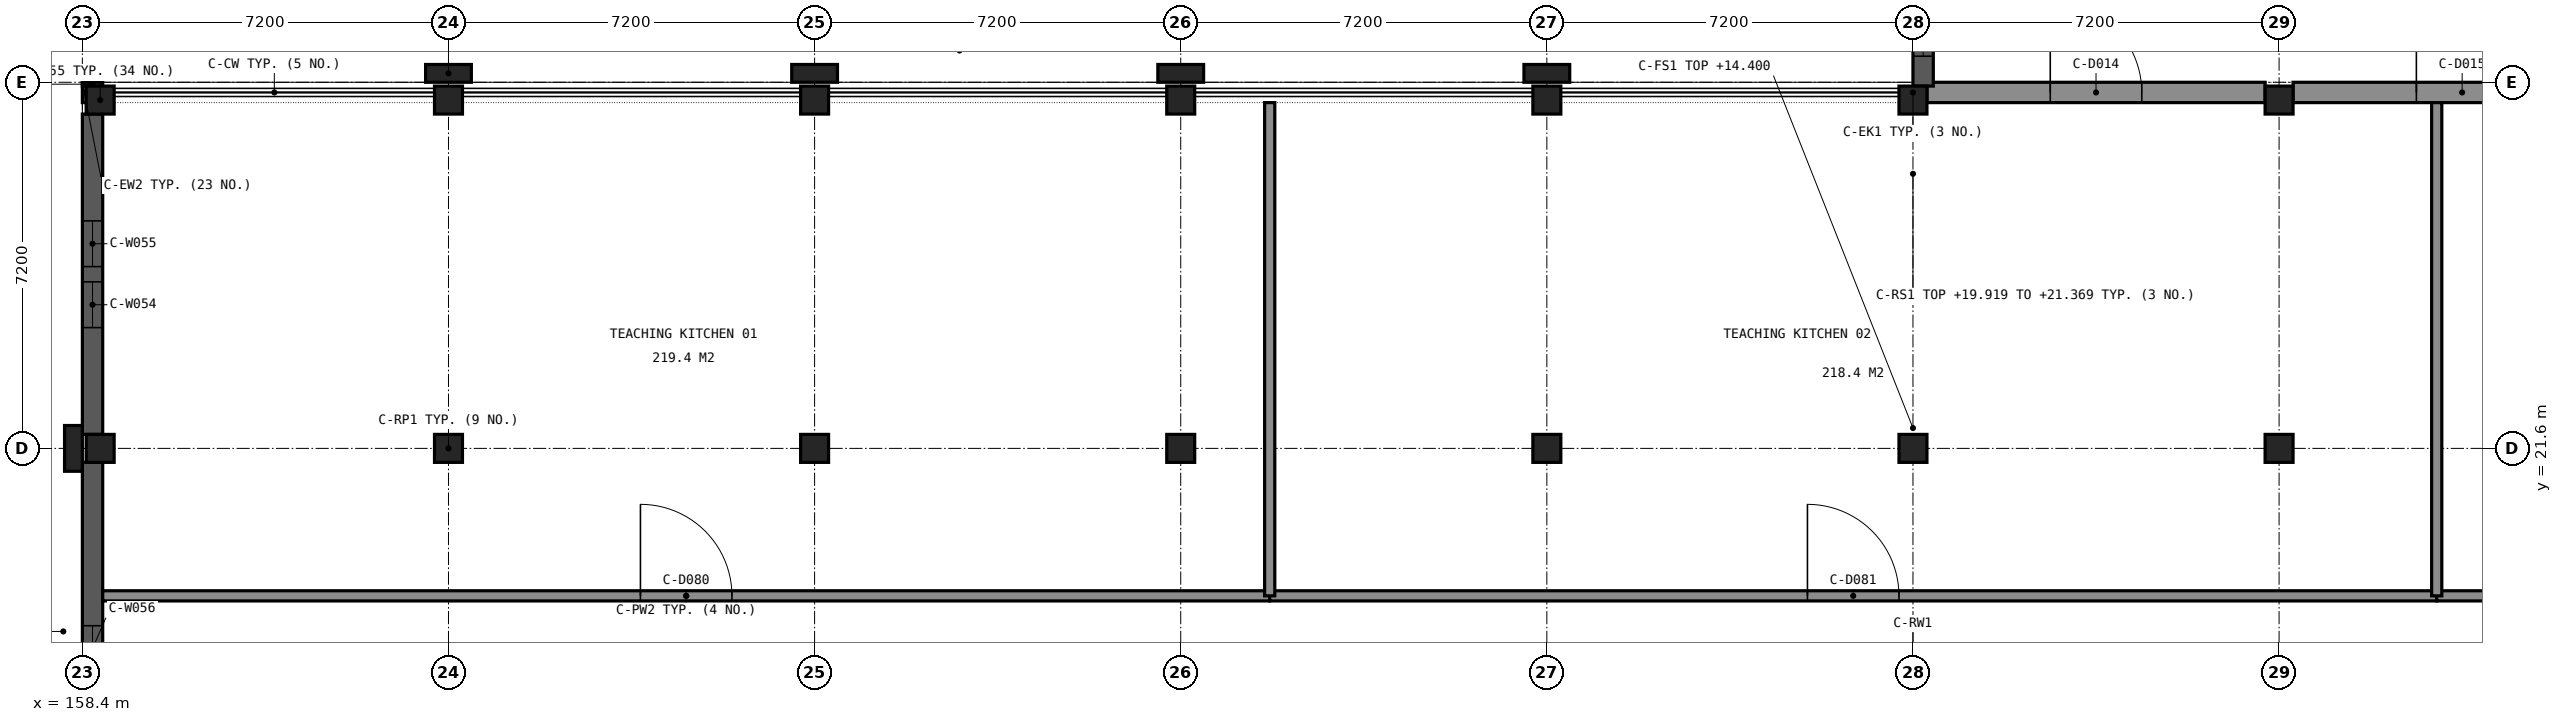
"""IFC4 building model, lengths in metres.
Left out: names, types, materials, properties, quantities, classifications, styles, units other than length and angle.
Written with IfcOpenShell. Run it as: python <this file> out.ifc"""

import sys

from ifc_helpers import new_model, si_unit, direction, frame, frame_2d, origin, origin_2d, place, context, subcontext, project, spatial, rectangle, extrude, element, fill, save


model = new_model("IFC4")
c1 = context("Model", 3, precision=1e-05, world=origin(), true_north=direction((0.0, 1.0)))
c2 = subcontext(c1, "Body", "Model", "MODEL_VIEW")
j1 = project(units=[si_unit("LENGTHUNIT", "METRE"), si_unit("PLANEANGLEUNIT", "RADIAN")], contexts=[c1])
p1 = place(None, origin())
s1 = spatial("IfcSite", under=j1, at=p1, CompositionType="ELEMENT")
p2 = place(p1, origin())
s2 = spatial("IfcBuilding", under=s1, at=p2, CompositionType="ELEMENT")
p3 = place(p2, frame((0.0, 0.0, 14.4)))
s3 = spatial("IfcBuildingStorey", under=s2, at=p3, CompositionType="ELEMENT", Elevation=14.4)
for number, where, z_axis, x_axis in (
    (1, (158.75, 28.45, 0.0), (0.0, 0.0, 1.0), (1.0, 0.0, 0.0)),
    (2, (165.6, 28.45, 0.0), (0.0, 0.0, 1.0), (1.0, 0.0, 0.0)),
    (3, (172.8, 28.45, 0.0), (0.0, 0.0, 1.0), (1.0, 0.0, 0.0)),
    (4, (180.0, 28.45, 0.0), (0.0, 0.0, 1.0), (1.0, 0.0, 0.0)),
    (5, (187.2, 28.45, 0.0), (0.0, 0.0, 1.0), (1.0, 0.0, 0.0)),
    (6, (194.4, 28.45, 0.0), (0.0, 0.0, 1.0), (1.0, 0.0, 0.0)),
    (7, (201.6, 28.45, 0.0), (0.0, 0.0, 1.0), (1.0, 0.0, 0.0)),
    (8, (158.75, 21.6, 0.0), (0.0, 0.0, 1.0), (1.0, 0.0, 0.0)),
    (9, (165.6, 21.6, 0.0), (0.0, 0.0, 1.0), (1.0, 0.0, 0.0)),
    (10, (172.8, 21.6, 0.0), (0.0, 0.0, 1.0), (1.0, 0.0, 0.0)),
    (11, (180.0, 21.6, 0.0), (0.0, 0.0, 1.0), (1.0, 0.0, 0.0)),
    (12, (187.2, 21.6, 0.0), (0.0, 0.0, 1.0), (1.0, 0.0, 0.0)),
    (13, (194.4, 21.6, 0.0), (0.0, 0.0, 1.0), (1.0, 0.0, 0.0)),
    (14, (201.6, 21.6, 0.0), (0.0, 0.0, 1.0), (1.0, 0.0, 0.0)),
):
    element("IfcColumn", number, at=place(p3, frame(where, z_axis=z_axis, x_axis=x_axis)), inside=s3, PredefinedType="COLUMN", context=c2, shape_type="SweptSolid", body=[
        extrude(rectangle(XDim=0.55, YDim=0.55, at=origin_2d()), origin(), (0.0, 0.0, 1.0), 4.8),
    ])
p4 = place(p3, frame((158.4, 28.6, 0.0), z_axis=(0.0, 0.0, 1.0), x_axis=(1.0, 0.0, 0.0)))
e15 = element("IfcWall", 15, at=p4, inside=s3, PredefinedType="SOLIDWALL", context=c2, shape_type="SweptSolid", body=[
    extrude(rectangle(XDim=0.075, YDim=0.4, at=frame_2d((0.038, 0.0))), origin(), (0.0, 0.0, 1.0), 3.7),
])
p5 = place(p3, frame((194.675, 28.6, 0.0), z_axis=(0.0, 0.0, 1.0), x_axis=(1.0, 0.0, 0.0)))
e16 = element("IfcWall", 16, at=p5, inside=s3, PredefinedType="SOLIDWALL", context=c2, shape_type="SweptSolid", body=[
    extrude(rectangle(XDim=6.65, YDim=0.4, at=frame_2d((3.325, 0.0))), origin(), (0.0, 0.0, 1.0), 3.7),
])
p6 = place(p5, frame((2.425, 0.0, 0.0)))
e17 = element("IfcOpeningElement", 17, at=p6, cuts=e16, PredefinedType="OPENING", context=c2, shape_type="SweptSolid", body=[
    extrude(rectangle(XDim=1.8, YDim=2.1, at=frame_2d((0.9, 1.05))), frame((0.0, 0.21, 0.0), z_axis=(0.0, -1.0, 0.0), x_axis=(1.0, 0.0, 0.0)), (0.0, 0.0, 1.0), 0.42),
])
p7 = place(p3, frame((201.875, 28.6, 0.0), z_axis=(0.0, 0.0, 1.0), x_axis=(1.0, 0.0, 0.0)))
e18 = element("IfcWall", 18, at=p7, inside=s3, PredefinedType="SOLIDWALL", context=c2, shape_type="SweptSolid", body=[
    extrude(rectangle(XDim=6.65, YDim=0.4, at=frame_2d((3.325, 0.0))), origin(), (0.0, 0.0, 1.0), 3.7),
])
p8 = place(p7, frame((2.425, 0.0, 0.0)))
e19 = element("IfcOpeningElement", 19, at=p8, cuts=e18, PredefinedType="OPENING", context=c2, shape_type="SweptSolid", body=[
    extrude(rectangle(XDim=1.8, YDim=2.1, at=frame_2d((0.9, 1.05))), frame((0.0, 0.21, 0.0), z_axis=(0.0, -1.0, 0.0), x_axis=(1.0, 0.0, 0.0)), (0.0, 0.0, 1.0), 0.42),
])
p9 = place(p3, frame((158.6, 28.725, 0.0), z_axis=(0.0, 0.0, 1.0), x_axis=(0.0, 1.0, 0.0)))
e20 = element("IfcWall", 20, at=p9, inside=s3, PredefinedType="SHEAR", context=c2, shape_type="SweptSolid", body=[
    extrude(rectangle(XDim=0.075, YDim=0.4, at=frame_2d((0.038, 0.0))), origin(), (0.0, 0.0, 1.0), 3.7),
])
p10 = place(p3, frame((158.6, 21.875, 0.0), z_axis=(0.0, 0.0, 1.0), x_axis=(0.0, 1.0, 0.0)))
e21 = element("IfcWall", 21, at=p10, inside=s3, PredefinedType="SHEAR", context=c2, shape_type="SweptSolid", body=[
    extrude(rectangle(XDim=6.3, YDim=0.4, at=frame_2d((3.15, 0.0))), origin(), (0.0, 0.0, 1.0), 3.7),
])
p11 = place(p10, frame((2.1, 0.0, 1.8)))
e22 = element("IfcOpeningElement", 22, at=p11, cuts=e21, PredefinedType="OPENING", context=c2, shape_type="SweptSolid", body=[
    extrude(rectangle(XDim=0.9, YDim=1.2, at=frame_2d((0.45, 0.6))), frame((0.0, 0.21, 0.0), z_axis=(0.0, -1.0, 0.0), x_axis=(1.0, 0.0, 0.0)), (0.0, 0.0, 1.0), 0.42),
])
p12 = place(p10, frame((3.3, 0.0, 1.8)))
e23 = element("IfcOpeningElement", 23, at=p12, cuts=e21, PredefinedType="OPENING", context=c2, shape_type="SweptSolid", body=[
    extrude(rectangle(XDim=0.9, YDim=1.2, at=frame_2d((0.45, 0.6))), frame((0.0, 0.21, 0.0), z_axis=(0.0, -1.0, 0.0), x_axis=(1.0, 0.0, 0.0)), (0.0, 0.0, 1.0), 0.42),
])
p13 = place(p3, frame((158.6, 15.2, 0.0), z_axis=(0.0, 0.0, 1.0), x_axis=(0.0, 1.0, 0.0)))
e24 = element("IfcWall", 24, at=p13, inside=s3, PredefinedType="SHEAR", context=c2, shape_type="SweptSolid", body=[
    extrude(rectangle(XDim=6.125, YDim=0.4, at=frame_2d((3.062, 0.0))), origin(), (0.0, 0.0, 1.0), 3.7),
])
p14 = place(p13, frame((2.012, 0.0, 1.8)))
e25 = element("IfcOpeningElement", 25, at=p14, cuts=e24, PredefinedType="OPENING", context=c2, shape_type="SweptSolid", body=[
    extrude(rectangle(XDim=0.9, YDim=1.2, at=frame_2d((0.45, 0.6))), frame((0.0, 0.21, 0.0), z_axis=(0.0, -1.0, 0.0), x_axis=(1.0, 0.0, 0.0)), (0.0, 0.0, 1.0), 0.42),
])
p15 = place(p3, frame((158.4, 28.6, 4.8), z_axis=(0.0, 0.0, 1.0), x_axis=(1.0, 0.0, 0.0)))
e26 = element("IfcWall", 26, at=p15, inside=s3, PredefinedType="SOLIDWALL", context=c2, shape_type="SweptSolid", body=[
    extrude(rectangle(XDim=72.0, YDim=0.4, at=frame_2d((36.0, 0.0))), origin(), (0.0, 0.0, 1.0), 0.45),
])
p16 = place(p3, frame((158.6, 17.8, 4.8), z_axis=(0.0, 0.0, 1.0), x_axis=(0.0, 1.0, 0.0)))
e27 = element("IfcWall", 27, at=p16, inside=s3, PredefinedType="SOLIDWALL", context=c2, shape_type="SweptSolid", body=[
    extrude(rectangle(XDim=10.6, YDim=0.4, at=frame_2d((5.3, 0.0))), origin(), (0.0, 0.0, 1.0), 0.45),
])
for number, where, z_axis, x_axis in (
    (28, (165.6, 21.6, 4.8), (0.0, 0.0, 1.0), (1.0, 0.0, 0.0)),
    (29, (172.8, 21.6, 4.8), (0.0, 0.0, 1.0), (1.0, 0.0, 0.0)),
    (30, (180.0, 21.6, 4.8), (0.0, 0.0, 1.0), (1.0, 0.0, 0.0)),
    (31, (187.2, 21.6, 4.8), (0.0, 0.0, 1.0), (1.0, 0.0, 0.0)),
    (32, (194.4, 21.6, 4.8), (0.0, 0.0, 1.0), (1.0, 0.0, 0.0)),
    (33, (201.6, 21.6, 4.8), (0.0, 0.0, 1.0), (1.0, 0.0, 0.0)),
):
    element("IfcColumn", number, at=place(p3, frame(where, z_axis=z_axis, x_axis=x_axis)), inside=s3, PredefinedType="COLUMN", context=c2, shape_type="SweptSolid", body=[
        extrude(rectangle(XDim=0.3, YDim=0.3, at=origin_2d()), origin(), (0.0, 0.0, 1.0), 1.4),
    ])
p17 = place(p3, frame((158.6, 15.6, 4.8), z_axis=(0.0, 0.0, 1.0), x_axis=(0.0, 1.0, 0.0)))
e34 = element("IfcWall", 34, at=p17, inside=s3, PredefinedType="PARAPET", context=c2, shape_type="SweptSolid", body=[
    extrude(rectangle(XDim=2.2, YDim=0.4, at=frame_2d((1.1, 0.0))), origin(), (0.0, 0.0, 1.0), 0.4),
])
for number, where, z_axis, x_axis in (
    (35, (165.6, 28.975, 0.0), (0.0, 0.0, 1.0), (1.0, 0.0, 0.0)),
    (36, (172.8, 28.975, 0.0), (0.0, 0.0, 1.0), (1.0, 0.0, 0.0)),
    (37, (180.0, 28.975, 0.0), (0.0, 0.0, 1.0), (1.0, 0.0, 0.0)),
    (38, (187.2, 28.975, 0.0), (0.0, 0.0, 1.0), (1.0, 0.0, 0.0)),
    (39, (158.225, 21.6, 0.0), (0.0, 0.0, 1.0), (0.0, 1.0, 0.0)),
):
    element("IfcColumn", number, at=place(p3, frame(where, z_axis=z_axis, x_axis=x_axis)), inside=s3, PredefinedType="PILASTER", context=c2, shape_type="SweptSolid", body=[
        extrude(rectangle(XDim=0.9, YDim=0.35, at=origin_2d()), origin(), (0.0, 0.0, 1.0), 3.9),
    ])
p18 = place(p3, frame((157.65, 29.425, 4.5), z_axis=(0.0, 0.0, 1.0), x_axis=(1.0, 0.0, 0.0)))
e40 = element("IfcWall", 40, at=p18, inside=s3, PredefinedType="SOLIDWALL", context=c2, shape_type="SweptSolid", body=[
    extrude(rectangle(XDim=36.0, YDim=0.25, at=frame_2d((18.0, 0.0))), origin(), (0.0, 0.0, 1.0), 0.65),
])
p19 = place(p3, frame((157.775, 7.2, 4.5), z_axis=(0.0, 0.0, 1.0), x_axis=(0.0, 1.0, 0.0)))
e41 = element("IfcWall", 41, at=p19, inside=s3, PredefinedType="SOLIDWALL", context=c2, shape_type="SweptSolid", body=[
    extrude(rectangle(XDim=21.6, YDim=0.25, at=frame_2d((10.8, 0.0))), origin(), (0.0, 0.0, 1.0), 0.65),
])
p20 = place(p3, frame((194.6, 28.725, 0.0), z_axis=(0.0, 0.0, 1.0), x_axis=(0.0, 1.0, 0.0)))
e42 = element("IfcWall", 42, at=p20, inside=s3, PredefinedType="SOLIDWALL", context=c2, shape_type="SweptSolid", body=[
    extrude(rectangle(XDim=2.075, YDim=0.4, at=frame_2d((1.038, 0.0))), origin(), (0.0, 0.0, 1.0), 4.893),
])
p21 = place(p20, frame((0.587, 0.0, 1.8)))
e43 = element("IfcOpeningElement", 43, at=p21, cuts=e42, PredefinedType="OPENING", context=c2, shape_type="SweptSolid", body=[
    extrude(rectangle(XDim=0.9, YDim=1.2, at=frame_2d((0.45, 0.6))), frame((0.0, 0.21, 0.0), z_axis=(0.0, -1.0, 0.0), x_axis=(1.0, 0.0, 0.0)), (0.0, 0.0, 1.0), 0.42),
])
p22 = place(p3, frame((158.8, 18.7, 0.0), z_axis=(0.0, 0.0, 1.0), x_axis=(1.0, 0.0, 0.0)))
e44 = element("IfcWall", 44, at=p22, inside=s3, PredefinedType="PARTITIONING", context=c2, shape_type="SweptSolid", body=[
    extrude(rectangle(XDim=22.95, YDim=0.2, at=frame_2d((11.475, 0.0))), origin(), (0.0, 0.0, 1.0), 3.7),
])
p23 = place(p22, frame((10.575, 0.0, 0.0)))
e45 = element("IfcOpeningElement", 45, at=p23, cuts=e44, PredefinedType="OPENING", context=c2, shape_type="SweptSolid", body=[
    extrude(rectangle(XDim=1.8, YDim=2.1, at=frame_2d((0.9, 1.05))), frame((0.0, 0.11, 0.0), z_axis=(0.0, -1.0, 0.0), x_axis=(1.0, 0.0, 0.0)), (0.0, 0.0, 1.0), 0.22),
])
p24 = place(p3, frame((181.75, 18.7, 0.0), z_axis=(0.0, 0.0, 1.0), x_axis=(1.0, 0.0, 0.0)))
e46 = element("IfcWall", 46, at=p24, inside=s3, PredefinedType="PARTITIONING", context=c2, shape_type="SweptSolid", body=[
    extrude(rectangle(XDim=22.95, YDim=0.2, at=frame_2d((11.475, 0.0))), origin(), (0.0, 0.0, 1.0), 3.7),
])
p25 = place(p24, frame((10.575, 0.0, 0.0)))
e47 = element("IfcOpeningElement", 47, at=p25, cuts=e46, PredefinedType="OPENING", context=c2, shape_type="SweptSolid", body=[
    extrude(rectangle(XDim=1.8, YDim=2.1, at=frame_2d((0.9, 1.05))), frame((0.0, 0.11, 0.0), z_axis=(0.0, -1.0, 0.0), x_axis=(1.0, 0.0, 0.0)), (0.0, 0.0, 1.0), 0.22),
])
p26 = place(p3, frame((204.7, 18.7, 0.0), z_axis=(0.0, 0.0, 1.0), x_axis=(1.0, 0.0, 0.0)))
e48 = element("IfcWall", 48, at=p26, inside=s3, PredefinedType="PARTITIONING", context=c2, shape_type="SweptSolid", body=[
    extrude(rectangle(XDim=12.65, YDim=0.2, at=frame_2d((6.325, 0.0))), origin(), (0.0, 0.0, 1.0), 3.7),
])
p27 = place(p26, frame((5.825, 0.0, 0.0)))
e49 = element("IfcOpeningElement", 49, at=p27, cuts=e48, PredefinedType="OPENING", context=c2, shape_type="SweptSolid", body=[
    extrude(rectangle(XDim=1.0, YDim=2.1, at=frame_2d((0.5, 1.05))), frame((0.0, 0.11, 0.0), z_axis=(0.0, -1.0, 0.0), x_axis=(1.0, 0.0, 0.0)), (0.0, 0.0, 1.0), 0.22),
])
for number, where, z_axis, x_axis in (
    (50, (181.75, 28.4, 0.0), (0.0, 0.0, 1.0), (0.0, -1.0, 0.0)),
    (51, (204.7, 28.4, 0.0), (0.0, 0.0, 1.0), (0.0, -1.0, 0.0)),
):
    element("IfcWall", number, at=place(p3, frame(where, z_axis=z_axis, x_axis=x_axis)), inside=s3, PredefinedType="PARTITIONING", context=c2, shape_type="SweptSolid", body=[
        extrude(rectangle(XDim=9.7, YDim=0.2, at=frame_2d((4.85, 0.0))), origin(), (0.0, 0.0, 1.0), 3.7),
    ])
p28 = place(p6, origin())
e52 = element("IfcDoor", 52, at=p28, inside=s3, OperationType="NOTDEFINED", PredefinedType="DOOR", context=c2, shape_type="SweptSolid", body=[
    extrude(rectangle(XDim=1.8, YDim=2.1, at=frame_2d((0.9, 1.05))), frame((0.0, 0.025, 0.0), z_axis=(0.0, -1.0, 0.0), x_axis=(1.0, 0.0, 0.0)), (0.0, 0.0, 1.0), 0.05),
])
fill(e17, e52)
p29 = place(p8, origin())
e53 = element("IfcDoor", 53, at=p29, inside=s3, OperationType="NOTDEFINED", PredefinedType="DOOR", context=c2, shape_type="SweptSolid", body=[
    extrude(rectangle(XDim=1.8, YDim=2.1, at=frame_2d((0.9, 1.05))), frame((0.0, 0.025, 0.0), z_axis=(0.0, -1.0, 0.0), x_axis=(1.0, 0.0, 0.0)), (0.0, 0.0, 1.0), 0.05),
])
fill(e19, e53)
p30 = place(p11, origin())
e54 = element("IfcWindow", 54, at=p30, inside=s3, PartitioningType="SINGLE_PANEL", PredefinedType="WINDOW", context=c2, shape_type="SweptSolid", body=[
    extrude(rectangle(XDim=0.9, YDim=1.2, at=frame_2d((0.45, 0.6))), frame((0.0, -0.09, 0.0), z_axis=(0.0, -1.0, 0.0), x_axis=(1.0, 0.0, 0.0)), (0.0, 0.0, 1.0), 0.06),
])
fill(e22, e54)
p31 = place(p12, origin())
e55 = element("IfcWindow", 55, at=p31, inside=s3, PartitioningType="SINGLE_PANEL", PredefinedType="WINDOW", context=c2, shape_type="SweptSolid", body=[
    extrude(rectangle(XDim=0.9, YDim=1.2, at=frame_2d((0.45, 0.6))), frame((0.0, -0.09, 0.0), z_axis=(0.0, -1.0, 0.0), x_axis=(1.0, 0.0, 0.0)), (0.0, 0.0, 1.0), 0.06),
])
fill(e23, e55)
p32 = place(p14, origin())
e56 = element("IfcWindow", 56, at=p32, inside=s3, PartitioningType="SINGLE_PANEL", PredefinedType="WINDOW", context=c2, shape_type="SweptSolid", body=[
    extrude(rectangle(XDim=0.9, YDim=1.2, at=frame_2d((0.45, 0.6))), frame((0.0, -0.09, 0.0), z_axis=(0.0, -1.0, 0.0), x_axis=(1.0, 0.0, 0.0)), (0.0, 0.0, 1.0), 0.06),
])
fill(e25, e56)
p33 = place(p21, origin())
e57 = element("IfcWindow", 57, at=p33, inside=s3, PartitioningType="SINGLE_PANEL", PredefinedType="WINDOW", context=c2, shape_type="SweptSolid", body=[
    extrude(rectangle(XDim=0.9, YDim=1.2, at=frame_2d((0.45, 0.6))), frame((0.0, -0.09, 0.0), z_axis=(0.0, -1.0, 0.0), x_axis=(1.0, 0.0, 0.0)), (0.0, 0.0, 1.0), 0.06),
])
fill(e43, e57)
p34 = place(p23, origin())
e58 = element("IfcDoor", 58, at=p34, inside=s3, OperationType="NOTDEFINED", PredefinedType="DOOR", context=c2, shape_type="SweptSolid", body=[
    extrude(rectangle(XDim=1.8, YDim=2.1, at=frame_2d((0.9, 1.05))), frame((0.0, 0.025, 0.0), z_axis=(0.0, -1.0, 0.0), x_axis=(1.0, 0.0, 0.0)), (0.0, 0.0, 1.0), 0.05),
])
fill(e45, e58)
p35 = place(p25, origin())
e59 = element("IfcDoor", 59, at=p35, inside=s3, OperationType="NOTDEFINED", PredefinedType="DOOR", context=c2, shape_type="SweptSolid", body=[
    extrude(rectangle(XDim=1.8, YDim=2.1, at=frame_2d((0.9, 1.05))), frame((0.0, 0.025, 0.0), z_axis=(0.0, -1.0, 0.0), x_axis=(1.0, 0.0, 0.0)), (0.0, 0.0, 1.0), 0.05),
])
fill(e47, e59)
save(model, sys.argv[1])
